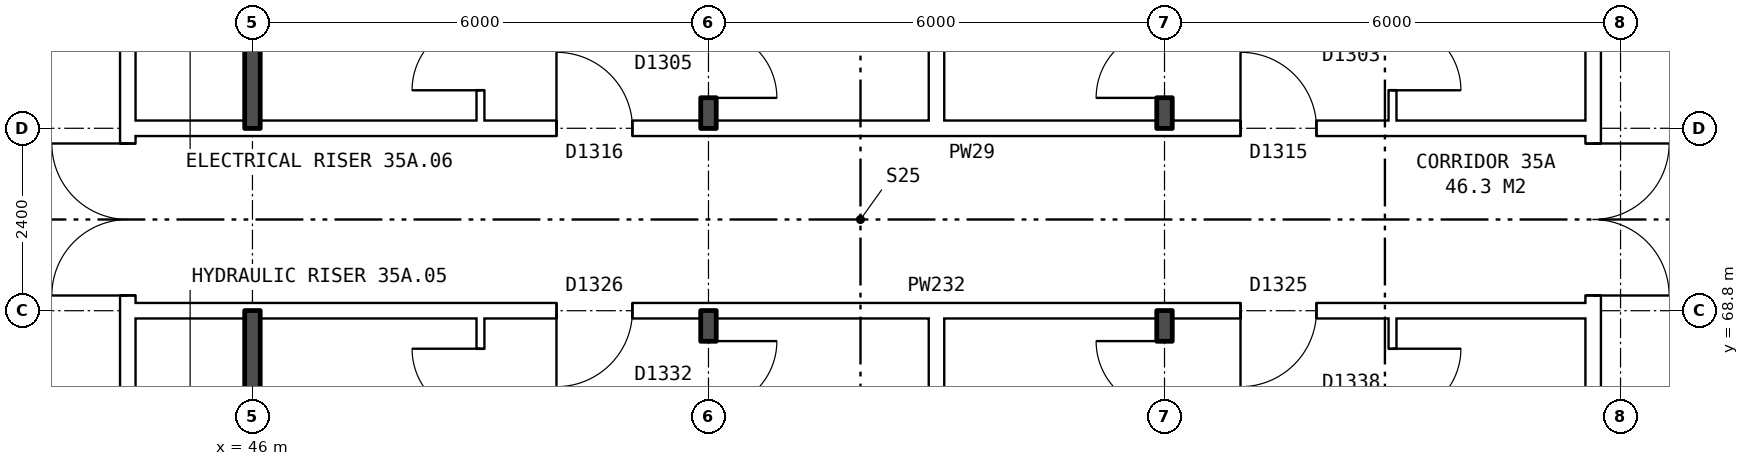
"""IFC4 building model, lengths in metres.
Left out: names, types, materials, properties, quantities, classifications, styles, units other than length and angle.
Written with IfcOpenShell. Run it as: python <this file> out.ifc"""

import sys

from ifc_helpers import new_model, si_unit, direction, frame, frame_2d, origin, place, context, subcontext, project, spatial, rectangle, extrude, element, fill, save


model = new_model("IFC4")
c1 = context("Model", 3, precision=1e-05, world=origin(), true_north=direction((0.0, 1.0)))
c2 = subcontext(c1, "Body", "Model", "MODEL_VIEW")
j1 = project(units=[si_unit("LENGTHUNIT", "METRE"), si_unit("PLANEANGLEUNIT", "RADIAN")], contexts=[c1])
p1 = place(None, origin())
s1 = spatial("IfcSite", under=j1, at=p1, CompositionType="ELEMENT")
p2 = place(p1, origin())
s2 = spatial("IfcBuilding", under=s1, at=p2, CompositionType="ELEMENT")
p3 = place(p2, frame((0.0, 0.0, 126.8)))
s3 = spatial("IfcBuildingStorey", under=s2, at=p3, CompositionType="ELEMENT", Elevation=126.8)
p4 = place(p3, frame((63.64, 63.9, 0.0), z_axis=(0.0, 0.0, 1.0), x_axis=(0.0, 1.0, 0.0)))
e1 = element("IfcWall", 1, at=p4, inside=s3, PredefinedType="PARTITIONING", context=c2, shape_type="SweptSolid", body=[
    extrude(rectangle(XDim=12.2, YDim=0.2, at=frame_2d((6.1, 0.0))), origin(), (0.0, 0.0, 1.0), 2.85),
])
p5 = place(p4, frame((5.1, 0.0, 0.0)))
e2 = element("IfcOpeningElement", 2, at=p5, cuts=e1, PredefinedType="OPENING", context=c2, shape_type="SweptSolid", body=[
    extrude(rectangle(XDim=2.0, YDim=2.1, at=frame_2d((1.0, 1.05))), frame((0.0, 0.11, 0.0), z_axis=(0.0, -1.0, 0.0), x_axis=(1.0, 0.0, 0.0)), (0.0, 0.0, 1.0), 0.22),
])
p6 = place(p3, frame((44.36, 63.9, 0.0), z_axis=(0.0, 0.0, 1.0), x_axis=(0.0, 1.0, 0.0)))
e3 = element("IfcWall", 3, at=p6, inside=s3, PredefinedType="PARTITIONING", context=c2, shape_type="SweptSolid", body=[
    extrude(rectangle(XDim=12.2, YDim=0.2, at=frame_2d((6.1, 0.0))), origin(), (0.0, 0.0, 1.0), 2.85),
])
p7 = place(p6, frame((5.1, 0.0, 0.0)))
e4 = element("IfcOpeningElement", 4, at=p7, cuts=e3, PredefinedType="OPENING", context=c2, shape_type="SweptSolid", body=[
    extrude(rectangle(XDim=2.0, YDim=2.1, at=frame_2d((1.0, 1.05))), frame((0.0, 0.11, 0.0), z_axis=(0.0, -1.0, 0.0), x_axis=(1.0, 0.0, 0.0)), (0.0, 0.0, 1.0), 0.22),
])
p8 = place(p3, frame((44.36, 68.8, 0.0), z_axis=(0.0, 0.0, 1.0), x_axis=(1.0, 0.0, 0.0)))
e5 = element("IfcWall", 5, at=p8, inside=s3, PredefinedType="PARTITIONING", context=c2, shape_type="SweptSolid", body=[
    extrude(rectangle(XDim=19.28, YDim=0.2, at=frame_2d((9.64, 0.0))), origin(), (0.0, 0.0, 1.0), 2.85),
])
p9 = place(p8, frame((14.64, 0.0, 0.0)))
e6 = element("IfcOpeningElement", 6, at=p9, cuts=e5, PredefinedType="OPENING", context=c2, shape_type="SweptSolid", body=[
    extrude(rectangle(XDim=1.0, YDim=2.1, at=frame_2d((0.5, 1.05))), frame((0.0, 0.11, 0.0), z_axis=(0.0, -1.0, 0.0), x_axis=(1.0, 0.0, 0.0)), (0.0, 0.0, 1.0), 0.22),
])
p10 = place(p8, frame((5.64, 0.0, 0.0)))
e7 = element("IfcOpeningElement", 7, at=p10, cuts=e5, PredefinedType="OPENING", context=c2, shape_type="SweptSolid", body=[
    extrude(rectangle(XDim=1.0, YDim=2.1, at=frame_2d((0.5, 1.05))), frame((0.0, 0.11, 0.0), z_axis=(0.0, -1.0, 0.0), x_axis=(1.0, 0.0, 0.0)), (0.0, 0.0, 1.0), 0.22),
])
p11 = place(p3, frame((44.36, 71.2, 0.0), z_axis=(0.0, 0.0, 1.0), x_axis=(1.0, 0.0, 0.0)))
e8 = element("IfcWall", 8, at=p11, inside=s3, PredefinedType="PARTITIONING", context=c2, shape_type="SweptSolid", body=[
    extrude(rectangle(XDim=19.28, YDim=0.2, at=frame_2d((9.64, 0.0))), origin(), (0.0, 0.0, 1.0), 2.85),
])
p12 = place(p11, frame((14.64, 0.0, 0.0)))
e9 = element("IfcOpeningElement", 9, at=p12, cuts=e8, PredefinedType="OPENING", context=c2, shape_type="SweptSolid", body=[
    extrude(rectangle(XDim=1.0, YDim=2.1, at=frame_2d((0.5, 1.05))), frame((0.0, 0.11, 0.0), z_axis=(0.0, -1.0, 0.0), x_axis=(1.0, 0.0, 0.0)), (0.0, 0.0, 1.0), 0.22),
])
p13 = place(p11, frame((5.64, 0.0, 0.0)))
e10 = element("IfcOpeningElement", 10, at=p13, cuts=e8, PredefinedType="OPENING", context=c2, shape_type="SweptSolid", body=[
    extrude(rectangle(XDim=1.0, YDim=2.1, at=frame_2d((0.5, 1.05))), frame((0.0, 0.11, 0.0), z_axis=(0.0, -1.0, 0.0), x_axis=(1.0, 0.0, 0.0)), (0.0, 0.0, 1.0), 0.22),
])
for number, where, z_axis, x_axis in (
    (11, (46.0, 63.8, 0.0), (0.0, 0.0, 1.0), (0.0, 1.0, 0.0)),
    (12, (46.0, 71.2, 0.0), (0.0, 0.0, 1.0), (0.0, 1.0, 0.0)),
):
    element("IfcWall", number, at=place(p3, frame(where, z_axis=z_axis, x_axis=x_axis)), inside=s3, PredefinedType="SOLIDWALL", context=c2, shape_type="SweptSolid", body=[
        extrude(rectangle(XDim=5.0, YDim=0.2, at=frame_2d((2.5, 0.0))), origin(), (0.0, 0.0, 1.0), 2.85),
    ])
p14 = place(p3, frame((49.0, 54.36, 0.0), z_axis=(0.0, 0.0, 1.0), x_axis=(0.0, 1.0, 0.0)))
e13 = element("IfcWall", 13, at=p14, inside=s3, PredefinedType="PARTITIONING", context=c2, shape_type="SweptSolid", body=[
    extrude(rectangle(XDim=14.34, YDim=0.1, at=frame_2d((7.17, 0.0))), origin(), (0.0, 0.0, 1.0), 2.85),
])
p15 = place(p14, frame((6.7, 0.0, 0.0)))
e14 = element("IfcOpeningElement", 14, at=p15, cuts=e13, PredefinedType="OPENING", context=c2, shape_type="SweptSolid", body=[
    extrude(rectangle(XDim=0.9, YDim=2.1, at=frame_2d((0.45, 1.05))), frame((0.0, 0.06, 0.0), z_axis=(0.0, -1.0, 0.0), x_axis=(1.0, 0.0, 0.0)), (0.0, 0.0, 1.0), 0.12),
])
p16 = place(p14, frame((13.04, 0.0, 0.0)))
e15 = element("IfcOpeningElement", 15, at=p16, cuts=e13, PredefinedType="OPENING", context=c2, shape_type="SweptSolid", body=[
    extrude(rectangle(XDim=0.9, YDim=2.1, at=frame_2d((0.45, 1.05))), frame((0.0, 0.06, 0.0), z_axis=(0.0, -1.0, 0.0), x_axis=(1.0, 0.0, 0.0)), (0.0, 0.0, 1.0), 0.12),
])
p17 = place(p3, frame((49.0, 71.3, 0.0), z_axis=(0.0, 0.0, 1.0), x_axis=(0.0, 1.0, 0.0)))
e16 = element("IfcWall", 16, at=p17, inside=s3, PredefinedType="PARTITIONING", context=c2, shape_type="SweptSolid", body=[
    extrude(rectangle(XDim=14.34, YDim=0.1, at=frame_2d((7.17, 0.0))), origin(), (0.0, 0.0, 1.0), 2.85),
])
p18 = place(p17, frame((6.74, 0.0, 0.0)))
e17 = element("IfcOpeningElement", 17, at=p18, cuts=e16, PredefinedType="OPENING", context=c2, shape_type="SweptSolid", body=[
    extrude(rectangle(XDim=0.9, YDim=2.1, at=frame_2d((0.45, 1.05))), frame((0.0, 0.06, 0.0), z_axis=(0.0, -1.0, 0.0), x_axis=(1.0, 0.0, 0.0)), (0.0, 0.0, 1.0), 0.12),
])
p19 = place(p17, frame((0.4, 0.0, 0.0)))
e18 = element("IfcOpeningElement", 18, at=p19, cuts=e16, PredefinedType="OPENING", context=c2, shape_type="SweptSolid", body=[
    extrude(rectangle(XDim=0.9, YDim=2.1, at=frame_2d((0.45, 1.05))), frame((0.0, 0.06, 0.0), z_axis=(0.0, -1.0, 0.0), x_axis=(1.0, 0.0, 0.0)), (0.0, 0.0, 1.0), 0.12),
])
p20 = place(p3, frame((52.0, 54.36, 0.0), z_axis=(0.0, 0.0, 1.0), x_axis=(0.0, 1.0, 0.0)))
e19 = element("IfcWall", 19, at=p20, inside=s3, PredefinedType="SOLIDWALL", context=c2, shape_type="SweptSolid", body=[
    extrude(rectangle(XDim=14.44, YDim=0.2, at=frame_2d((7.22, 0.0))), origin(), (0.0, 0.0, 1.0), 2.85),
])
p21 = place(p20, frame((6.7, 0.0, 0.0)))
e20 = element("IfcOpeningElement", 20, at=p21, cuts=e19, PredefinedType="OPENING", context=c2, shape_type="SweptSolid", body=[
    extrude(rectangle(XDim=0.9, YDim=2.1, at=frame_2d((0.45, 1.05))), frame((0.0, 0.11, 0.0), z_axis=(0.0, -1.0, 0.0), x_axis=(1.0, 0.0, 0.0)), (0.0, 0.0, 1.0), 0.22),
])
p22 = place(p20, frame((13.14, 0.0, 0.0)))
e21 = element("IfcOpeningElement", 21, at=p22, cuts=e19, PredefinedType="OPENING", context=c2, shape_type="SweptSolid", body=[
    extrude(rectangle(XDim=0.9, YDim=2.1, at=frame_2d((0.45, 1.05))), frame((0.0, 0.11, 0.0), z_axis=(0.0, -1.0, 0.0), x_axis=(1.0, 0.0, 0.0)), (0.0, 0.0, 1.0), 0.22),
])
p23 = place(p3, frame((52.0, 71.2, 0.0), z_axis=(0.0, 0.0, 1.0), x_axis=(0.0, 1.0, 0.0)))
e22 = element("IfcWall", 22, at=p23, inside=s3, PredefinedType="SOLIDWALL", context=c2, shape_type="SweptSolid", body=[
    extrude(rectangle(XDim=14.44, YDim=0.2, at=frame_2d((7.22, 0.0))), origin(), (0.0, 0.0, 1.0), 2.85),
])
p24 = place(p23, frame((6.84, 0.0, 0.0)))
e23 = element("IfcOpeningElement", 23, at=p24, cuts=e22, PredefinedType="OPENING", context=c2, shape_type="SweptSolid", body=[
    extrude(rectangle(XDim=0.9, YDim=2.1, at=frame_2d((0.45, 1.05))), frame((0.0, 0.11, 0.0), z_axis=(0.0, -1.0, 0.0), x_axis=(1.0, 0.0, 0.0)), (0.0, 0.0, 1.0), 0.22),
])
p25 = place(p23, frame((0.4, 0.0, 0.0)))
e24 = element("IfcOpeningElement", 24, at=p25, cuts=e22, PredefinedType="OPENING", context=c2, shape_type="SweptSolid", body=[
    extrude(rectangle(XDim=0.9, YDim=2.1, at=frame_2d((0.45, 1.05))), frame((0.0, 0.11, 0.0), z_axis=(0.0, -1.0, 0.0), x_axis=(1.0, 0.0, 0.0)), (0.0, 0.0, 1.0), 0.22),
])
for number, where, z_axis, x_axis in (
    (25, (55.0, 54.36, 0.0), (0.0, 0.0, 1.0), (0.0, 1.0, 0.0)),
    (26, (55.0, 71.3, 0.0), (0.0, 0.0, 1.0), (0.0, 1.0, 0.0)),
):
    element("IfcWall", number, at=place(p3, frame(where, z_axis=z_axis, x_axis=x_axis)), inside=s3, PredefinedType="PARTITIONING", context=c2, shape_type="SweptSolid", body=[
        extrude(rectangle(XDim=14.34, YDim=0.2, at=frame_2d((7.17, 0.0))), origin(), (0.0, 0.0, 1.0), 2.85),
    ])
p26 = place(p3, frame((58.0, 54.36, 0.0), z_axis=(0.0, 0.0, 1.0), x_axis=(0.0, 1.0, 0.0)))
e27 = element("IfcWall", 27, at=p26, inside=s3, PredefinedType="SOLIDWALL", context=c2, shape_type="SweptSolid", body=[
    extrude(rectangle(XDim=14.44, YDim=0.2, at=frame_2d((7.22, 0.0))), origin(), (0.0, 0.0, 1.0), 2.85),
])
p27 = place(p26, frame((4.2, 0.0, 0.0)))
e28 = element("IfcOpeningElement", 28, at=p27, cuts=e27, PredefinedType="OPENING", context=c2, shape_type="SweptSolid", body=[
    extrude(rectangle(XDim=0.9, YDim=2.1, at=frame_2d((0.45, 1.05))), frame((0.0, 0.11, 0.0), z_axis=(0.0, -1.0, 0.0), x_axis=(1.0, 0.0, 0.0)), (0.0, 0.0, 1.0), 0.22),
])
p28 = place(p26, frame((13.14, 0.0, 0.0)))
e29 = element("IfcOpeningElement", 29, at=p28, cuts=e27, PredefinedType="OPENING", context=c2, shape_type="SweptSolid", body=[
    extrude(rectangle(XDim=0.9, YDim=2.1, at=frame_2d((0.45, 1.05))), frame((0.0, 0.11, 0.0), z_axis=(0.0, -1.0, 0.0), x_axis=(1.0, 0.0, 0.0)), (0.0, 0.0, 1.0), 0.22),
])
p29 = place(p3, frame((58.0, 71.2, 0.0), z_axis=(0.0, 0.0, 1.0), x_axis=(0.0, 1.0, 0.0)))
e30 = element("IfcWall", 30, at=p29, inside=s3, PredefinedType="SOLIDWALL", context=c2, shape_type="SweptSolid", body=[
    extrude(rectangle(XDim=14.44, YDim=0.2, at=frame_2d((7.22, 0.0))), origin(), (0.0, 0.0, 1.0), 2.85),
])
p30 = place(p29, frame((9.34, 0.0, 0.0)))
e31 = element("IfcOpeningElement", 31, at=p30, cuts=e30, PredefinedType="OPENING", context=c2, shape_type="SweptSolid", body=[
    extrude(rectangle(XDim=0.9, YDim=2.1, at=frame_2d((0.45, 1.05))), frame((0.0, 0.11, 0.0), z_axis=(0.0, -1.0, 0.0), x_axis=(1.0, 0.0, 0.0)), (0.0, 0.0, 1.0), 0.22),
])
p31 = place(p29, frame((0.4, 0.0, 0.0)))
e32 = element("IfcOpeningElement", 32, at=p31, cuts=e30, PredefinedType="OPENING", context=c2, shape_type="SweptSolid", body=[
    extrude(rectangle(XDim=0.9, YDim=2.1, at=frame_2d((0.45, 1.05))), frame((0.0, 0.11, 0.0), z_axis=(0.0, -1.0, 0.0), x_axis=(1.0, 0.0, 0.0)), (0.0, 0.0, 1.0), 0.22),
])
p32 = place(p3, frame((61.0, 54.36, 0.0), z_axis=(0.0, 0.0, 1.0), x_axis=(0.0, 1.0, 0.0)))
e33 = element("IfcWall", 33, at=p32, inside=s3, PredefinedType="PARTITIONING", context=c2, shape_type="SweptSolid", body=[
    extrude(rectangle(XDim=14.34, YDim=0.1, at=frame_2d((7.17, 0.0))), origin(), (0.0, 0.0, 1.0), 2.85),
])
p33 = place(p32, frame((4.2, 0.0, 0.0)))
e34 = element("IfcOpeningElement", 34, at=p33, cuts=e33, PredefinedType="OPENING", context=c2, shape_type="SweptSolid", body=[
    extrude(rectangle(XDim=0.9, YDim=2.1, at=frame_2d((0.45, 1.05))), frame((0.0, 0.06, 0.0), z_axis=(0.0, -1.0, 0.0), x_axis=(1.0, 0.0, 0.0)), (0.0, 0.0, 1.0), 0.12),
])
p34 = place(p32, frame((13.04, 0.0, 0.0)))
e35 = element("IfcOpeningElement", 35, at=p34, cuts=e33, PredefinedType="OPENING", context=c2, shape_type="SweptSolid", body=[
    extrude(rectangle(XDim=0.9, YDim=2.1, at=frame_2d((0.45, 1.05))), frame((0.0, 0.06, 0.0), z_axis=(0.0, -1.0, 0.0), x_axis=(1.0, 0.0, 0.0)), (0.0, 0.0, 1.0), 0.12),
])
p35 = place(p3, frame((61.0, 71.3, 0.0), z_axis=(0.0, 0.0, 1.0), x_axis=(0.0, 1.0, 0.0)))
e36 = element("IfcWall", 36, at=p35, inside=s3, PredefinedType="PARTITIONING", context=c2, shape_type="SweptSolid", body=[
    extrude(rectangle(XDim=14.34, YDim=0.1, at=frame_2d((7.17, 0.0))), origin(), (0.0, 0.0, 1.0), 2.85),
])
p36 = place(p35, frame((9.24, 0.0, 0.0)))
e37 = element("IfcOpeningElement", 37, at=p36, cuts=e36, PredefinedType="OPENING", context=c2, shape_type="SweptSolid", body=[
    extrude(rectangle(XDim=0.9, YDim=2.1, at=frame_2d((0.45, 1.05))), frame((0.0, 0.06, 0.0), z_axis=(0.0, -1.0, 0.0), x_axis=(1.0, 0.0, 0.0)), (0.0, 0.0, 1.0), 0.12),
])
p37 = place(p35, frame((0.4, 0.0, 0.0)))
e38 = element("IfcOpeningElement", 38, at=p37, cuts=e36, PredefinedType="OPENING", context=c2, shape_type="SweptSolid", body=[
    extrude(rectangle(XDim=0.9, YDim=2.1, at=frame_2d((0.45, 1.05))), frame((0.0, 0.06, 0.0), z_axis=(0.0, -1.0, 0.0), x_axis=(1.0, 0.0, 0.0)), (0.0, 0.0, 1.0), 0.12),
])
p38 = place(p5, frame((2.0, 0.0, 0.0), z_axis=(0.0, 0.0, 1.0), x_axis=(-1.0, 0.0, 0.0)))
e39 = element("IfcDoor", 39, at=p38, inside=s3, OperationType="DOUBLE_DOOR_SINGLE_SWING", PredefinedType="DOOR", context=c2, shape_type="SweptSolid", body=[
    extrude(rectangle(XDim=2.0, YDim=2.1, at=frame_2d((1.0, 1.05))), frame((0.0, 0.025, 0.0), z_axis=(0.0, -1.0, 0.0), x_axis=(1.0, 0.0, 0.0)), (0.0, 0.0, 1.0), 0.05),
])
fill(e2, e39)
p39 = place(p7, origin())
e40 = element("IfcDoor", 40, at=p39, inside=s3, OperationType="DOUBLE_DOOR_SINGLE_SWING", PredefinedType="DOOR", context=c2, shape_type="SweptSolid", body=[
    extrude(rectangle(XDim=2.0, YDim=2.1, at=frame_2d((1.0, 1.05))), frame((0.0, 0.025, 0.0), z_axis=(0.0, -1.0, 0.0), x_axis=(1.0, 0.0, 0.0)), (0.0, 0.0, 1.0), 0.05),
])
fill(e4, e40)
p40 = place(p9, frame((1.0, 0.0, 0.0), z_axis=(0.0, 0.0, 1.0), x_axis=(-1.0, 0.0, 0.0)))
e41 = element("IfcDoor", 41, at=p40, inside=s3, OperationType="SINGLE_SWING_RIGHT", PredefinedType="DOOR", context=c2, shape_type="SweptSolid", body=[
    extrude(rectangle(XDim=1.0, YDim=2.1, at=frame_2d((0.5, 1.05))), frame((0.0, 0.025, 0.0), z_axis=(0.0, -1.0, 0.0), x_axis=(1.0, 0.0, 0.0)), (0.0, 0.0, 1.0), 0.05),
])
fill(e6, e41)
p41 = place(p34, frame((0.9, 0.0, 0.0), z_axis=(0.0, 0.0, 1.0), x_axis=(-1.0, 0.0, 0.0)))
e42 = element("IfcDoor", 42, at=p41, inside=s3, OperationType="SINGLE_SWING_LEFT", PredefinedType="DOOR", context=c2, shape_type="SweptSolid", body=[
    extrude(rectangle(XDim=0.9, YDim=2.1, at=frame_2d((0.45, 1.05))), frame((0.0, 0.025, 0.0), z_axis=(0.0, -1.0, 0.0), x_axis=(1.0, 0.0, 0.0)), (0.0, 0.0, 1.0), 0.05),
])
fill(e35, e42)
p42 = place(p28, origin())
e43 = element("IfcDoor", 43, at=p42, inside=s3, OperationType="SINGLE_SWING_RIGHT", PredefinedType="DOOR", context=c2, shape_type="SweptSolid", body=[
    extrude(rectangle(XDim=0.9, YDim=2.1, at=frame_2d((0.45, 1.05))), frame((0.0, 0.025, 0.0), z_axis=(0.0, -1.0, 0.0), x_axis=(1.0, 0.0, 0.0)), (0.0, 0.0, 1.0), 0.05),
])
fill(e29, e43)
p43 = place(p10, frame((1.0, 0.0, 0.0), z_axis=(0.0, 0.0, 1.0), x_axis=(-1.0, 0.0, 0.0)))
e44 = element("IfcDoor", 44, at=p43, inside=s3, OperationType="SINGLE_SWING_RIGHT", PredefinedType="DOOR", context=c2, shape_type="SweptSolid", body=[
    extrude(rectangle(XDim=1.0, YDim=2.1, at=frame_2d((0.5, 1.05))), frame((0.0, 0.025, 0.0), z_axis=(0.0, -1.0, 0.0), x_axis=(1.0, 0.0, 0.0)), (0.0, 0.0, 1.0), 0.05),
])
fill(e7, e44)
p44 = place(p22, frame((0.9, 0.0, 0.0), z_axis=(0.0, 0.0, 1.0), x_axis=(-1.0, 0.0, 0.0)))
e45 = element("IfcDoor", 45, at=p44, inside=s3, OperationType="SINGLE_SWING_LEFT", PredefinedType="DOOR", context=c2, shape_type="SweptSolid", body=[
    extrude(rectangle(XDim=0.9, YDim=2.1, at=frame_2d((0.45, 1.05))), frame((0.0, 0.025, 0.0), z_axis=(0.0, -1.0, 0.0), x_axis=(1.0, 0.0, 0.0)), (0.0, 0.0, 1.0), 0.05),
])
fill(e21, e45)
p45 = place(p16, origin())
e46 = element("IfcDoor", 46, at=p45, inside=s3, OperationType="SINGLE_SWING_RIGHT", PredefinedType="DOOR", context=c2, shape_type="SweptSolid", body=[
    extrude(rectangle(XDim=0.9, YDim=2.1, at=frame_2d((0.45, 1.05))), frame((0.0, 0.025, 0.0), z_axis=(0.0, -1.0, 0.0), x_axis=(1.0, 0.0, 0.0)), (0.0, 0.0, 1.0), 0.05),
])
fill(e15, e46)
p46 = place(p12, origin())
e47 = element("IfcDoor", 47, at=p46, inside=s3, OperationType="SINGLE_SWING_LEFT", PredefinedType="DOOR", context=c2, shape_type="SweptSolid", body=[
    extrude(rectangle(XDim=1.0, YDim=2.1, at=frame_2d((0.5, 1.05))), frame((0.0, 0.025, 0.0), z_axis=(0.0, -1.0, 0.0), x_axis=(1.0, 0.0, 0.0)), (0.0, 0.0, 1.0), 0.05),
])
fill(e9, e47)
p47 = place(p37, frame((0.9, 0.0, 0.0), z_axis=(0.0, 0.0, 1.0), x_axis=(-1.0, 0.0, 0.0)))
e48 = element("IfcDoor", 48, at=p47, inside=s3, OperationType="SINGLE_SWING_RIGHT", PredefinedType="DOOR", context=c2, shape_type="SweptSolid", body=[
    extrude(rectangle(XDim=0.9, YDim=2.1, at=frame_2d((0.45, 1.05))), frame((0.0, 0.025, 0.0), z_axis=(0.0, -1.0, 0.0), x_axis=(1.0, 0.0, 0.0)), (0.0, 0.0, 1.0), 0.05),
])
fill(e38, e48)
p48 = place(p31, origin())
e49 = element("IfcDoor", 49, at=p48, inside=s3, OperationType="SINGLE_SWING_LEFT", PredefinedType="DOOR", context=c2, shape_type="SweptSolid", body=[
    extrude(rectangle(XDim=0.9, YDim=2.1, at=frame_2d((0.45, 1.05))), frame((0.0, 0.025, 0.0), z_axis=(0.0, -1.0, 0.0), x_axis=(1.0, 0.0, 0.0)), (0.0, 0.0, 1.0), 0.05),
])
fill(e32, e49)
p49 = place(p13, origin())
e50 = element("IfcDoor", 50, at=p49, inside=s3, OperationType="SINGLE_SWING_LEFT", PredefinedType="DOOR", context=c2, shape_type="SweptSolid", body=[
    extrude(rectangle(XDim=1.0, YDim=2.1, at=frame_2d((0.5, 1.05))), frame((0.0, 0.025, 0.0), z_axis=(0.0, -1.0, 0.0), x_axis=(1.0, 0.0, 0.0)), (0.0, 0.0, 1.0), 0.05),
])
fill(e10, e50)
p50 = place(p25, frame((0.9, 0.0, 0.0), z_axis=(0.0, 0.0, 1.0), x_axis=(-1.0, 0.0, 0.0)))
e51 = element("IfcDoor", 51, at=p50, inside=s3, OperationType="SINGLE_SWING_RIGHT", PredefinedType="DOOR", context=c2, shape_type="SweptSolid", body=[
    extrude(rectangle(XDim=0.9, YDim=2.1, at=frame_2d((0.45, 1.05))), frame((0.0, 0.025, 0.0), z_axis=(0.0, -1.0, 0.0), x_axis=(1.0, 0.0, 0.0)), (0.0, 0.0, 1.0), 0.05),
])
fill(e24, e51)
p51 = place(p19, origin())
e52 = element("IfcDoor", 52, at=p51, inside=s3, OperationType="SINGLE_SWING_LEFT", PredefinedType="DOOR", context=c2, shape_type="SweptSolid", body=[
    extrude(rectangle(XDim=0.9, YDim=2.1, at=frame_2d((0.45, 1.05))), frame((0.0, 0.025, 0.0), z_axis=(0.0, -1.0, 0.0), x_axis=(1.0, 0.0, 0.0)), (0.0, 0.0, 1.0), 0.05),
])
fill(e18, e52)
save(model, sys.argv[1])
